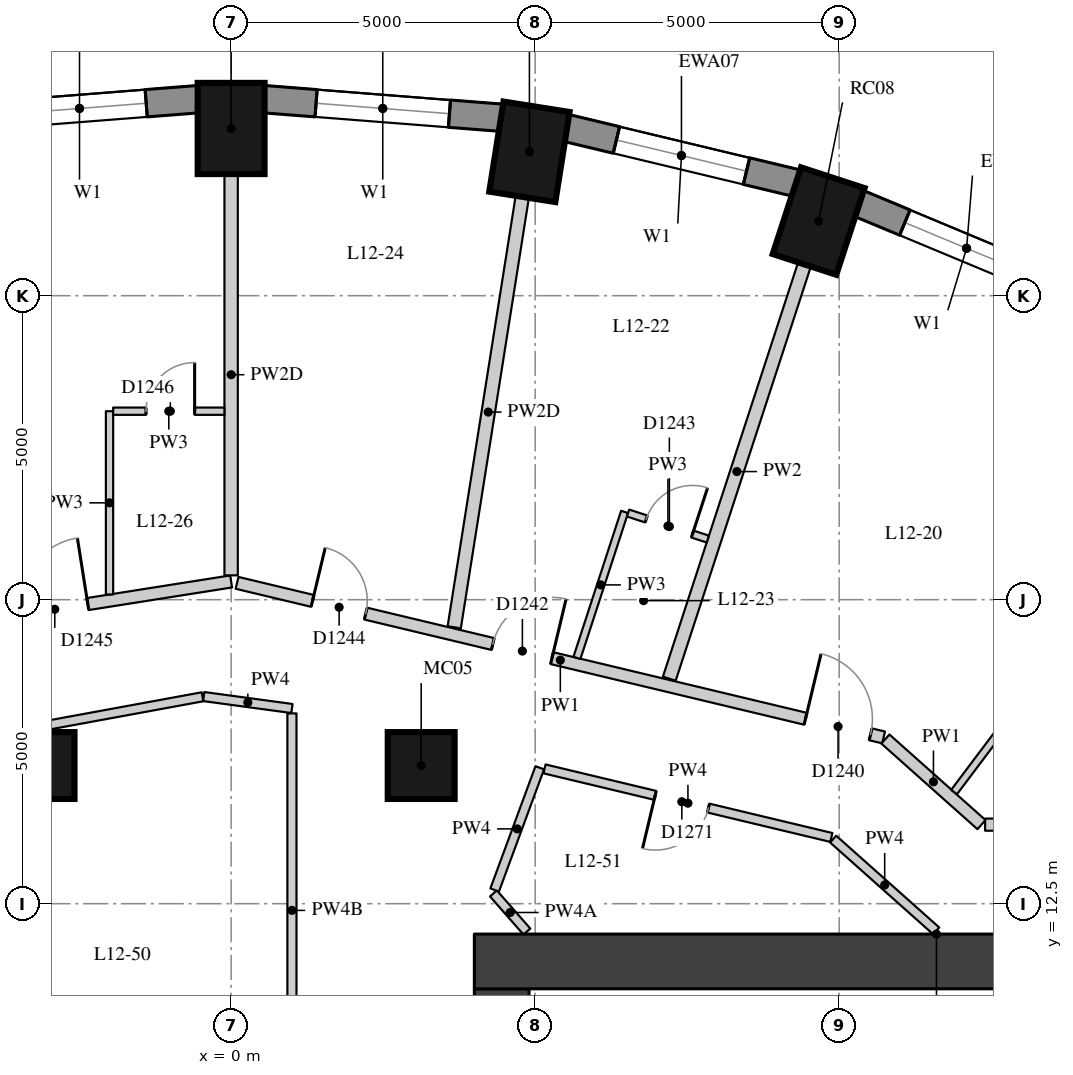
"""IFC4 building model, lengths in metres.
Left out: names, types, materials, properties, quantities, classifications, styles, units other than length and angle.
Written with IfcOpenShell. Run it as: python <this file> out.ifc"""

import sys

from ifc_helpers import new_model, si_unit, direction, frame, frame_2d, origin, origin_2d, place, context, subcontext, project, spatial, rectangle, extrude, element, fill, save


model = new_model("IFC4")
c1 = context("Model", 3, precision=1e-05, world=origin(), true_north=direction((0.0, 1.0)))
c2 = subcontext(c1, "Body", "Model", "MODEL_VIEW")
j1 = project(units=[si_unit("LENGTHUNIT", "METRE"), si_unit("PLANEANGLEUNIT", "RADIAN")], contexts=[c1])
p1 = place(None, origin())
s1 = spatial("IfcSite", under=j1, at=p1, CompositionType="ELEMENT")
p2 = place(p1, origin())
s2 = spatial("IfcBuilding", under=s1, at=p2, CompositionType="ELEMENT")
p3 = place(p2, frame((0.0, 0.0, 48.1)))
s3 = spatial("IfcBuildingStorey", under=s2, at=p3, CompositionType="ELEMENT", Elevation=48.1)
for number, where, z_axis, x_axis in (
    (1, (9.662, 23.727, 0.0), (0.0, 0.0, 1.0), (0.31, 0.951, 0.0)),
    (2, (4.906, 24.866, 0.0), (0.0, 0.0, 1.0), (0.156, 0.988, 0.0)),
    (3, (0.0, 25.25, 0.0), (0.0, 0.0, 1.0), (0.0, 1.0, 0.0)),
):
    element("IfcColumn", number, at=place(p3, frame(where, z_axis=z_axis, x_axis=x_axis)), inside=s3, PredefinedType="COLUMN", context=c2, shape_type="SweptSolid", body=[
        extrude(rectangle(XDim=1.5, YDim=1.1, at=origin_2d()), origin(), (0.0, 0.0, 1.0), 3.3),
    ])
for number, where, z_axis, x_axis in (
    (4, (3.126, 14.772, 0.0), (0.0, 0.0, 1.0), (1.0, 0.0, 0.0)),
    (5, (-3.126, 14.772, 0.0), (0.0, 0.0, 1.0), (1.0, 0.0, 0.0)),
):
    element("IfcColumn", number, at=place(p3, frame(where, z_axis=z_axis, x_axis=x_axis)), inside=s3, PredefinedType="COLUMN", context=c2, shape_type="SweptSolid", body=[
        extrude(rectangle(XDim=1.1, YDim=1.1, at=origin_2d()), origin(), (0.0, 0.0, 1.0), 3.3),
    ])
p4 = place(p3, frame((13.875, 22.537, 0.0), z_axis=(0.0, 0.0, 1.0), x_axis=(-0.923031964282, 0.384723267966, 0.0)))
e6 = element("IfcWall", 6, at=p4, inside=s3, PredefinedType="SOLIDWALL", context=c2, shape_type="SweptSolid", body=[
    extrude(rectangle(XDim=3.856, YDim=0.45, at=frame_2d((1.928, 0.0))), origin(), (0.0, 0.0, 1.0), 3.02),
])
p5 = place(p4, frame((0.828, 0.0, 0.4)))
e7 = element("IfcOpeningElement", 7, at=p5, cuts=e6, PredefinedType="OPENING", context=c2, shape_type="SweptSolid", body=[
    extrude(rectangle(XDim=2.2, YDim=1.75, at=frame_2d((1.1, 0.875))), frame((0.0, 0.235, 0.0), z_axis=(0.0, -1.0, 0.0), x_axis=(1.0, 0.0, 0.0)), (0.0, 0.0, 1.0), 0.47),
])
p6 = place(p3, frame((9.308, 24.35, 0.0), z_axis=(0.0, 0.0, 1.0), x_axis=(-0.972496561493, 0.232917233979, 0.0)))
e8 = element("IfcWall", 8, at=p6, inside=s3, PredefinedType="SOLIDWALL", context=c2, shape_type="SweptSolid", body=[
    extrude(rectangle(XDim=3.911, YDim=0.45, at=frame_2d((1.956, 0.0))), origin(), (0.0, 0.0, 1.0), 3.02),
])
p7 = place(p6, frame((0.855, 0.0, 0.4)))
e9 = element("IfcOpeningElement", 9, at=p7, cuts=e8, PredefinedType="OPENING", context=c2, shape_type="SweptSolid", body=[
    extrude(rectangle(XDim=2.2, YDim=1.75, at=frame_2d((1.1, 0.875))), frame((0.0, 0.235, 0.0), z_axis=(0.0, -1.0, 0.0), x_axis=(1.0, 0.0, 0.0)), (0.0, 0.0, 1.0), 0.47),
])
p8 = place(p3, frame((4.457, 25.426, 0.0), z_axis=(0.0, 0.0, 1.0), x_axis=(-0.996955972145, 0.077966592873, 0.0)))
e10 = element("IfcWall", 10, at=p8, inside=s3, PredefinedType="SOLIDWALL", context=c2, shape_type="SweptSolid", body=[
    extrude(rectangle(XDim=3.939, YDim=0.45, at=frame_2d((1.97, 0.0))), origin(), (0.0, 0.0, 1.0), 3.02),
])
p9 = place(p8, frame((0.87, 0.0, 0.4)))
e11 = element("IfcOpeningElement", 11, at=p9, cuts=e10, PredefinedType="OPENING", context=c2, shape_type="SweptSolid", body=[
    extrude(rectangle(XDim=2.2, YDim=1.75, at=frame_2d((1.1, 0.875))), frame((0.0, 0.235, 0.0), z_axis=(0.0, -1.0, 0.0), x_axis=(1.0, 0.0, 0.0)), (0.0, 0.0, 1.0), 0.47),
])
p10 = place(p3, frame((-0.53, 25.733, 0.0), z_axis=(0.0, 0.0, 1.0), x_axis=(-0.996955972145, -0.077966592873, 0.0)))
e12 = element("IfcWall", 12, at=p10, inside=s3, PredefinedType="SOLIDWALL", context=c2, shape_type="SweptSolid", body=[
    extrude(rectangle(XDim=3.939, YDim=0.45, at=frame_2d((1.97, 0.0))), origin(), (0.0, 0.0, 1.0), 3.02),
])
p11 = place(p10, frame((0.87, 0.0, 0.4)))
e13 = element("IfcOpeningElement", 13, at=p11, cuts=e12, PredefinedType="OPENING", context=c2, shape_type="SweptSolid", body=[
    extrude(rectangle(XDim=2.2, YDim=1.75, at=frame_2d((1.1, 0.875))), frame((0.0, 0.235, 0.0), z_axis=(0.0, -1.0, 0.0), x_axis=(1.0, 0.0, 0.0)), (0.0, 0.0, 1.0), 0.47),
])
p12 = place(p3, frame((4.45, -11.1, 0.0), z_axis=(0.0, 0.0, 1.0), x_axis=(0.0, 1.0, 0.0)))
e14 = element("IfcWall", 14, at=p12, inside=s3, PredefinedType="SHEAR", context=c2, shape_type="SweptSolid", body=[
    extrude(rectangle(XDim=22.2, YDim=0.9, at=frame_2d((11.1, 0.0))), origin(), (0.0, 0.0, 1.0), 3.02),
])
p13 = place(p12, frame((2.35, 0.0, 0.0)))
e15 = element("IfcOpeningElement", 15, at=p13, cuts=e14, PredefinedType="OPENING", context=c2, shape_type="SweptSolid", body=[
    extrude(rectangle(XDim=1.5, YDim=2.1, at=frame_2d((0.75, 1.05))), frame((0.0, 0.46, 0.0), z_axis=(0.0, -1.0, 0.0), x_axis=(1.0, 0.0, 0.0)), (0.0, 0.0, 1.0), 0.92),
])
p14 = place(p12, frame((5.45, 0.0, 0.0)))
e16 = element("IfcOpeningElement", 16, at=p14, cuts=e14, PredefinedType="OPENING", context=c2, shape_type="SweptSolid", body=[
    extrude(rectangle(XDim=1.8, YDim=2.1, at=frame_2d((0.9, 1.05))), frame((0.0, 0.46, 0.0), z_axis=(0.0, -1.0, 0.0), x_axis=(1.0, 0.0, 0.0)), (0.0, 0.0, 1.0), 0.92),
])
p15 = place(p12, frame((7.95, 0.0, 0.0)))
e17 = element("IfcOpeningElement", 17, at=p15, cuts=e14, PredefinedType="OPENING", context=c2, shape_type="SweptSolid", body=[
    extrude(rectangle(XDim=1.1, YDim=2.1, at=frame_2d((0.55, 1.05))), frame((0.0, 0.46, 0.0), z_axis=(0.0, -1.0, 0.0), x_axis=(1.0, 0.0, 0.0)), (0.0, 0.0, 1.0), 0.92),
])
p16 = place(p12, frame((10.6, 0.0, 0.0)))
e18 = element("IfcOpeningElement", 18, at=p16, cuts=e14, PredefinedType="OPENING", context=c2, shape_type="SweptSolid", body=[
    extrude(rectangle(XDim=1.0, YDim=2.1, at=frame_2d((0.5, 1.05))), frame((0.0, 0.46, 0.0), z_axis=(0.0, -1.0, 0.0), x_axis=(1.0, 0.0, 0.0)), (0.0, 0.0, 1.0), 0.92),
])
p17 = place(p12, frame((13.15, 0.0, 0.0)))
e19 = element("IfcOpeningElement", 19, at=p17, cuts=e14, PredefinedType="OPENING", context=c2, shape_type="SweptSolid", body=[
    extrude(rectangle(XDim=1.1, YDim=2.1, at=frame_2d((0.55, 1.05))), frame((0.0, 0.46, 0.0), z_axis=(0.0, -1.0, 0.0), x_axis=(1.0, 0.0, 0.0)), (0.0, 0.0, 1.0), 0.92),
])
p18 = place(p12, frame((14.95, 0.0, 0.0)))
e20 = element("IfcOpeningElement", 20, at=p18, cuts=e14, PredefinedType="OPENING", context=c2, shape_type="SweptSolid", body=[
    extrude(rectangle(XDim=1.8, YDim=2.1, at=frame_2d((0.9, 1.05))), frame((0.0, 0.46, 0.0), z_axis=(0.0, -1.0, 0.0), x_axis=(1.0, 0.0, 0.0)), (0.0, 0.0, 1.0), 0.92),
])
p19 = place(p12, frame((18.35, 0.0, 0.0)))
e21 = element("IfcOpeningElement", 21, at=p19, cuts=e14, PredefinedType="OPENING", context=c2, shape_type="SweptSolid", body=[
    extrude(rectangle(XDim=1.5, YDim=2.1, at=frame_2d((0.75, 1.05))), frame((0.0, 0.46, 0.0), z_axis=(0.0, -1.0, 0.0), x_axis=(1.0, 0.0, 0.0)), (0.0, 0.0, 1.0), 0.92),
])
p20 = place(p3, frame((4.0, 11.55, 0.0), z_axis=(0.0, 0.0, 1.0), x_axis=(1.0, 0.0, 0.0)))
e22 = element("IfcWall", 22, at=p20, inside=s3, PredefinedType="SHEAR", context=c2, shape_type="SweptSolid", body=[
    extrude(rectangle(XDim=15.2, YDim=0.9, at=frame_2d((7.6, 0.0))), origin(), (0.0, 0.0, 1.0), 3.02),
])
p21 = place(p3, frame((-7.256, 16.656, 0.0), z_axis=(0.0, 0.0, 1.0), x_axis=(0.987787475409, 0.15580726371, 0.0)))
e23 = element("IfcWall", 23, at=p21, inside=s3, PredefinedType="PARTITIONING", context=c2, shape_type="SweptSolid", body=[
    extrude(rectangle(XDim=7.346, YDim=0.2, at=frame_2d((3.673, 0.0))), origin(), (0.0, 0.0, 1.0), 3.02),
])
p22 = place(p21, frame((3.86, 0.0, 0.0)))
e24 = element("IfcOpeningElement", 24, at=p22, cuts=e23, PredefinedType="OPENING", context=c2, shape_type="SweptSolid", body=[
    extrude(rectangle(XDim=1.1, YDim=2.1, at=frame_2d((0.55, 1.05))), frame((0.0, 0.11, 0.0), z_axis=(0.0, -1.0, 0.0), x_axis=(1.0, 0.0, 0.0)), (0.0, 0.0, 1.0), 0.22),
])
p23 = place(p3, frame((0.098, 17.777, 0.0), z_axis=(0.0, 0.0, 1.0), x_axis=(0.97258196627, -0.232560355362, 0.0)))
e25 = element("IfcWall", 25, at=p23, inside=s3, PredefinedType="PARTITIONING", context=c2, shape_type="SweptSolid", body=[
    extrude(rectangle(XDim=10.933, YDim=0.2, at=frame_2d((5.466, 0.0))), origin(), (0.0, 0.0, 1.0), 3.02),
])
p24 = place(p23, frame((9.613, 0.0, 0.0)))
e26 = element("IfcOpeningElement", 26, at=p24, cuts=e25, PredefinedType="OPENING", context=c2, shape_type="SweptSolid", body=[
    extrude(rectangle(XDim=1.1, YDim=2.1, at=frame_2d((0.55, 1.05))), frame((0.0, 0.11, 0.0), z_axis=(0.0, -1.0, 0.0), x_axis=(1.0, 0.0, 0.0)), (0.0, 0.0, 1.0), 0.22),
])
p25 = place(p23, frame((4.325, 0.0, 0.0)))
e27 = element("IfcOpeningElement", 27, at=p25, cuts=e25, PredefinedType="OPENING", context=c2, shape_type="SweptSolid", body=[
    extrude(rectangle(XDim=1.0, YDim=2.1, at=frame_2d((0.5, 1.05))), frame((0.0, 0.11, 0.0), z_axis=(0.0, -1.0, 0.0), x_axis=(1.0, 0.0, 0.0)), (0.0, 0.0, 1.0), 0.22),
])
p26 = place(p23, frame((1.276, 0.0, 0.0)))
e28 = element("IfcOpeningElement", 28, at=p26, cuts=e25, PredefinedType="OPENING", context=c2, shape_type="SweptSolid", body=[
    extrude(rectangle(XDim=0.9, YDim=2.1, at=frame_2d((0.45, 1.05))), frame((0.0, 0.11, 0.0), z_axis=(0.0, -1.0, 0.0), x_axis=(1.0, 0.0, 0.0)), (0.0, 0.0, 1.0), 0.22),
])
p27 = place(p3, frame((10.76, 15.208, 0.0), z_axis=(0.0, 0.0, 1.0), x_axis=(0.746600460158, -0.665272690626, 0.0)))
e29 = element("IfcWall", 29, at=p27, inside=s3, PredefinedType="PARTITIONING", context=c2, shape_type="SweptSolid", body=[
    extrude(rectangle(XDim=2.116, YDim=0.2, at=frame_2d((1.058, 0.0))), origin(), (0.0, 0.0, 1.0), 3.02),
])
p28 = place(p3, frame((12.4, 13.8, 0.0), z_axis=(0.0, 0.0, 1.0), x_axis=(1.0, 0.0, 0.0)))
e30 = element("IfcWall", 30, at=p28, inside=s3, PredefinedType="PARTITIONING", context=c2, shape_type="SweptSolid", body=[
    extrude(rectangle(XDim=8.6, YDim=0.2, at=frame_2d((4.3, 0.0))), origin(), (0.0, 0.0, 1.0), 3.02),
])
p29 = place(p28, frame((4.084, 0.0, 0.0)))
e31 = element("IfcOpeningElement", 31, at=p29, cuts=e30, PredefinedType="OPENING", context=c2, shape_type="SweptSolid", body=[
    extrude(rectangle(XDim=1.8, YDim=2.1, at=frame_2d((0.9, 1.05))), frame((0.0, 0.11, 0.0), z_axis=(0.0, -1.0, 0.0), x_axis=(1.0, 0.0, 0.0)), (0.0, 0.0, 1.0), 0.22),
])
p30 = place(p3, frame((-0.451, 15.907, 0.0), z_axis=(0.0, 0.0, 1.0), x_axis=(0.99094751199, -0.134249873301, 0.0)))
e32 = element("IfcWall", 32, at=p30, inside=s3, PredefinedType="PARTITIONING", context=c2, shape_type="SweptSolid", body=[
    extrude(rectangle(XDim=1.464, YDim=0.15, at=frame_2d((0.732, 0.0))), origin(), (0.0, 0.0, 1.0), 3.02),
])
p31 = place(p3, frame((1.0, 15.63, 0.0), z_axis=(0.0, 0.0, 1.0), x_axis=(0.0, -1.0, 0.0)))
e33 = element("IfcWall", 33, at=p31, inside=s3, PredefinedType="PARTITIONING", context=c2, shape_type="SweptSolid", body=[
    extrude(rectangle(XDim=6.48, YDim=0.15, at=frame_2d((3.24, 0.0))), origin(), (0.0, 0.0, 1.0), 2.47),
])
p32 = place(p3, frame((-7.021, 14.701, 0.0), z_axis=(0.0, 0.0, 1.0), x_axis=(0.983567630435, 0.180540068573, 0.0)))
e34 = element("IfcWall", 34, at=p32, inside=s3, PredefinedType="PARTITIONING", context=c2, shape_type="SweptSolid", body=[
    extrude(rectangle(XDim=6.66, YDim=0.15, at=frame_2d((3.33, 0.0))), origin(), (0.0, 0.0, 1.0), 2.57),
])
p33 = place(p3, frame((4.865, 12.042, 0.0), z_axis=(0.0, 0.0, 1.0), x_axis=(-0.660014599896, 0.751252772323, 0.0)))
e35 = element("IfcWall", 35, at=p33, inside=s3, PredefinedType="PARTITIONING", context=c2, shape_type="SweptSolid", body=[
    extrude(rectangle(XDim=0.835, YDim=0.15, at=frame_2d((0.417, 0.0))), origin(), (0.0, 0.0, 1.0), 2.57),
])
p34 = place(p3, frame((4.334, 12.725, 0.0), z_axis=(0.0, 0.0, 1.0), x_axis=(0.346111853175, 0.938193255727, 0.0)))
e36 = element("IfcWall", 36, at=p34, inside=s3, PredefinedType="PARTITIONING", context=c2, shape_type="SweptSolid", body=[
    extrude(rectangle(XDim=2.143, YDim=0.15, at=frame_2d((1.072, 0.0))), origin(), (0.0, 0.0, 1.0), 3.02),
])
p35 = place(p3, frame((5.154, 14.717, 0.0), z_axis=(0.0, 0.0, 1.0), x_axis=(0.972587058657, -0.232539057651, 0.0)))
e37 = element("IfcWall", 37, at=p35, inside=s3, PredefinedType="PARTITIONING", context=c2, shape_type="SweptSolid", body=[
    extrude(rectangle(XDim=4.851, YDim=0.15, at=frame_2d((2.425, 0.0))), origin(), (0.0, 0.0, 1.0), 3.02),
])
p36 = place(p35, frame((1.872, 0.0, 0.0)))
e38 = element("IfcOpeningElement", 38, at=p36, cuts=e37, PredefinedType="OPENING", context=c2, shape_type="SweptSolid", body=[
    extrude(rectangle(XDim=0.9, YDim=2.1, at=frame_2d((0.45, 1.05))), frame((0.0, 0.085, 0.0), z_axis=(0.0, -1.0, 0.0), x_axis=(1.0, 0.0, 0.0)), (0.0, 0.0, 1.0), 0.17),
])
p37 = place(p3, frame((9.901, 13.562, 0.0), z_axis=(0.0, 0.0, 1.0), x_axis=(0.746696753395, -0.665164610054, 0.0)))
e39 = element("IfcWall", 39, at=p37, inside=s3, PredefinedType="PARTITIONING", context=c2, shape_type="SweptSolid", body=[
    extrude(rectangle(XDim=2.27, YDim=0.15, at=frame_2d((1.135, 0.0))), origin(), (0.0, 0.0, 1.0), 3.02),
])
p38 = place(p3, frame((9.429, 23.014, 0.0), z_axis=(0.0, 0.0, 1.0), x_axis=(-0.310212691368, -0.950667179466, 0.0)))
e40 = element("IfcWall", 40, at=p38, inside=s3, PredefinedType="PARTITIONING", context=c2, shape_type="SweptSolid", body=[
    extrude(rectangle(XDim=7.167, YDim=0.22, at=frame_2d((3.583, 0.0))), origin(), (0.0, 0.0, 1.0), 3.02),
])
p39 = place(p3, frame((4.788, 24.125, 0.0), z_axis=(0.0, 0.0, 1.0), x_axis=(-0.156146236489, -0.987733948404, 0.0)))
e41 = element("IfcWall", 41, at=p39, inside=s3, PredefinedType="PARTITIONING", context=c2, shape_type="SweptSolid", body=[
    extrude(rectangle(XDim=7.167, YDim=0.22, at=frame_2d((3.583, 0.0))), origin(), (0.0, 0.0, 1.0), 2.47),
])
p40 = place(p3, frame((0.0, 24.5, 0.0), z_axis=(0.0, 0.0, 1.0), x_axis=(0.0, -1.0, 0.0)))
e42 = element("IfcWall", 42, at=p40, inside=s3, PredefinedType="PARTITIONING", context=c2, shape_type="SweptSolid", body=[
    extrude(rectangle(XDim=6.6, YDim=0.22, at=frame_2d((3.3, 0.0))), origin(), (0.0, 0.0, 1.0), 2.47),
])
p41 = place(p3, frame((11.889, 14.336, 0.0), z_axis=(0.0, 0.0, 1.0), x_axis=(0.601160173805, 0.799128553758, 0.0)))
e43 = element("IfcWall", 43, at=p41, inside=s3, PredefinedType="PARTITIONING", context=c2, shape_type="SweptSolid", body=[
    extrude(rectangle(XDim=3.634, YDim=0.12, at=frame_2d((1.817, 0.0))), origin(), (0.0, 0.0, 1.0), 3.02),
])
p42 = place(p3, frame((5.687, 16.543, 0.0), z_axis=(0.0, 0.0, 1.0), x_axis=(0.310246659943, 0.950656094492, 0.0)))
e44 = element("IfcWall", 44, at=p42, inside=s3, PredefinedType="PARTITIONING", context=c2, shape_type="SweptSolid", body=[
    extrude(rectangle(XDim=2.525, YDim=0.12, at=frame_2d((1.263, 0.0))), origin(), (0.0, 0.0, 1.0), 3.02),
])
p43 = place(p3, frame((-2.0, 17.586, 0.0), z_axis=(0.0, 0.0, 1.0), x_axis=(0.0, 1.0, 0.0)))
e45 = element("IfcWall", 45, at=p43, inside=s3, PredefinedType="PARTITIONING", context=c2, shape_type="SweptSolid", body=[
    extrude(rectangle(XDim=3.014, YDim=0.12, at=frame_2d((1.507, 0.0))), origin(), (0.0, 0.0, 1.0), 3.02),
])
p44 = place(p3, frame((6.528, 18.925, 0.0), z_axis=(0.0, 0.0, 1.0), x_axis=(0.950628893115, -0.310329997864, 0.0)))
e46 = element("IfcWall", 46, at=p44, inside=s3, PredefinedType="PARTITIONING", context=c2, shape_type="SweptSolid", body=[
    extrude(rectangle(XDim=1.38, YDim=0.12, at=frame_2d((0.69, 0.0))), origin(), (0.0, 0.0, 1.0), 3.02),
])
p45 = place(p44, frame((0.315, 0.0, 0.0)))
e47 = element("IfcOpeningElement", 47, at=p45, cuts=e46, PredefinedType="OPENING", context=c2, shape_type="SweptSolid", body=[
    extrude(rectangle(XDim=0.8, YDim=2.1, at=frame_2d((0.4, 1.05))), frame((0.0, 0.07, 0.0), z_axis=(0.0, -1.0, 0.0), x_axis=(1.0, 0.0, 0.0)), (0.0, 0.0, 1.0), 0.14),
])
p46 = place(p3, frame((-1.94, 20.6, 0.0), z_axis=(0.0, 0.0, 1.0), x_axis=(1.0, 0.0, 0.0)))
e48 = element("IfcWall", 48, at=p46, inside=s3, PredefinedType="PARTITIONING", context=c2, shape_type="SweptSolid", body=[
    extrude(rectangle(XDim=1.83, YDim=0.12, at=frame_2d((0.915, 0.0))), origin(), (0.0, 0.0, 1.0), 3.02),
])
p47 = place(p46, frame((0.54, 0.0, 0.0)))
e49 = element("IfcOpeningElement", 49, at=p47, cuts=e48, PredefinedType="OPENING", context=c2, shape_type="SweptSolid", body=[
    extrude(rectangle(XDim=0.8, YDim=2.1, at=frame_2d((0.4, 1.05))), frame((0.0, 0.07, 0.0), z_axis=(0.0, -1.0, 0.0), x_axis=(1.0, 0.0, 0.0)), (0.0, 0.0, 1.0), 0.14),
])
p48 = place(p5, origin())
e50 = element("IfcWindow", 50, at=p48, inside=s3, PartitioningType="SINGLE_PANEL", PredefinedType="WINDOW", context=c2, shape_type="SweptSolid", body=[
    extrude(rectangle(XDim=2.2, YDim=1.75, at=frame_2d((1.1, 0.875))), frame((0.0, 0.035, 0.0), z_axis=(0.0, -1.0, 0.0), x_axis=(1.0, 0.0, 0.0)), (0.0, 0.0, 1.0), 0.06),
])
fill(e7, e50)
p49 = place(p7, origin())
e51 = element("IfcWindow", 51, at=p49, inside=s3, PartitioningType="SINGLE_PANEL", PredefinedType="WINDOW", context=c2, shape_type="SweptSolid", body=[
    extrude(rectangle(XDim=2.2, YDim=1.75, at=frame_2d((1.1, 0.875))), frame((0.0, 0.035, 0.0), z_axis=(0.0, -1.0, 0.0), x_axis=(1.0, 0.0, 0.0)), (0.0, 0.0, 1.0), 0.06),
])
fill(e9, e51)
p50 = place(p9, origin())
e52 = element("IfcWindow", 52, at=p50, inside=s3, PartitioningType="SINGLE_PANEL", PredefinedType="WINDOW", context=c2, shape_type="SweptSolid", body=[
    extrude(rectangle(XDim=2.2, YDim=1.75, at=frame_2d((1.1, 0.875))), frame((0.0, 0.035, 0.0), z_axis=(0.0, -1.0, 0.0), x_axis=(1.0, 0.0, 0.0)), (0.0, 0.0, 1.0), 0.06),
])
fill(e11, e52)
p51 = place(p11, origin())
e53 = element("IfcWindow", 53, at=p51, inside=s3, PartitioningType="SINGLE_PANEL", PredefinedType="WINDOW", context=c2, shape_type="SweptSolid", body=[
    extrude(rectangle(XDim=2.2, YDim=1.75, at=frame_2d((1.1, 0.875))), frame((0.0, 0.035, 0.0), z_axis=(0.0, -1.0, 0.0), x_axis=(1.0, 0.0, 0.0)), (0.0, 0.0, 1.0), 0.06),
])
fill(e13, e53)
p52 = place(p24, origin())
e54 = element("IfcDoor", 54, at=p52, inside=s3, OperationType="SINGLE_SWING_LEFT", PredefinedType="DOOR", context=c2, shape_type="SweptSolid", body=[
    extrude(rectangle(XDim=1.1, YDim=2.1, at=frame_2d((0.55, 1.05))), frame((0.0, 0.025, 0.0), z_axis=(0.0, -1.0, 0.0), x_axis=(1.0, 0.0, 0.0)), (0.0, 0.0, 1.0), 0.05),
])
fill(e26, e54)
p53 = place(p25, origin())
e55 = element("IfcDoor", 55, at=p53, inside=s3, OperationType="SINGLE_SWING_RIGHT", PredefinedType="DOOR", context=c2, shape_type="SweptSolid", body=[
    extrude(rectangle(XDim=1.0, YDim=2.1, at=frame_2d((0.5, 1.05))), frame((0.0, 0.025, 0.0), z_axis=(0.0, -1.0, 0.0), x_axis=(1.0, 0.0, 0.0)), (0.0, 0.0, 1.0), 0.05),
])
fill(e27, e55)
p54 = place(p45, origin())
e56 = element("IfcDoor", 56, at=p54, inside=s3, OperationType="SINGLE_SWING_RIGHT", PredefinedType="DOOR", context=c2, shape_type="SweptSolid", body=[
    extrude(rectangle(XDim=0.8, YDim=2.1, at=frame_2d((0.4, 1.05))), frame((0.0, 0.025, 0.0), z_axis=(0.0, -1.0, 0.0), x_axis=(1.0, 0.0, 0.0)), (0.0, 0.0, 1.0), 0.05),
])
fill(e47, e56)
p55 = place(p26, origin())
e57 = element("IfcDoor", 57, at=p55, inside=s3, OperationType="SINGLE_SWING_LEFT", PredefinedType="DOOR", context=c2, shape_type="SweptSolid", body=[
    extrude(rectangle(XDim=0.9, YDim=2.1, at=frame_2d((0.45, 1.05))), frame((0.0, 0.025, 0.0), z_axis=(0.0, -1.0, 0.0), x_axis=(1.0, 0.0, 0.0)), (0.0, 0.0, 1.0), 0.05),
])
fill(e28, e57)
p56 = place(p22, origin())
e58 = element("IfcDoor", 58, at=p56, inside=s3, OperationType="SINGLE_SWING_RIGHT", PredefinedType="DOOR", context=c2, shape_type="SweptSolid", body=[
    extrude(rectangle(XDim=1.1, YDim=2.1, at=frame_2d((0.55, 1.05))), frame((0.0, 0.025, 0.0), z_axis=(0.0, -1.0, 0.0), x_axis=(1.0, 0.0, 0.0)), (0.0, 0.0, 1.0), 0.05),
])
fill(e24, e58)
p57 = place(p47, origin())
e59 = element("IfcDoor", 59, at=p57, inside=s3, OperationType="SINGLE_SWING_RIGHT", PredefinedType="DOOR", context=c2, shape_type="SweptSolid", body=[
    extrude(rectangle(XDim=0.8, YDim=2.1, at=frame_2d((0.4, 1.05))), frame((0.0, 0.025, 0.0), z_axis=(0.0, -1.0, 0.0), x_axis=(1.0, 0.0, 0.0)), (0.0, 0.0, 1.0), 0.05),
])
fill(e49, e59)
p58 = place(p36, origin())
e60 = element("IfcDoor", 60, at=p58, inside=s3, OperationType="SINGLE_SWING_RIGHT", PredefinedType="DOOR", context=c2, shape_type="SweptSolid", body=[
    extrude(rectangle(XDim=0.9, YDim=2.1, at=frame_2d((0.45, 1.05))), frame((0.0, 0.025, 0.0), z_axis=(0.0, -1.0, 0.0), x_axis=(1.0, 0.0, 0.0)), (0.0, 0.0, 1.0), 0.05),
])
fill(e38, e60)
save(model, sys.argv[1])
